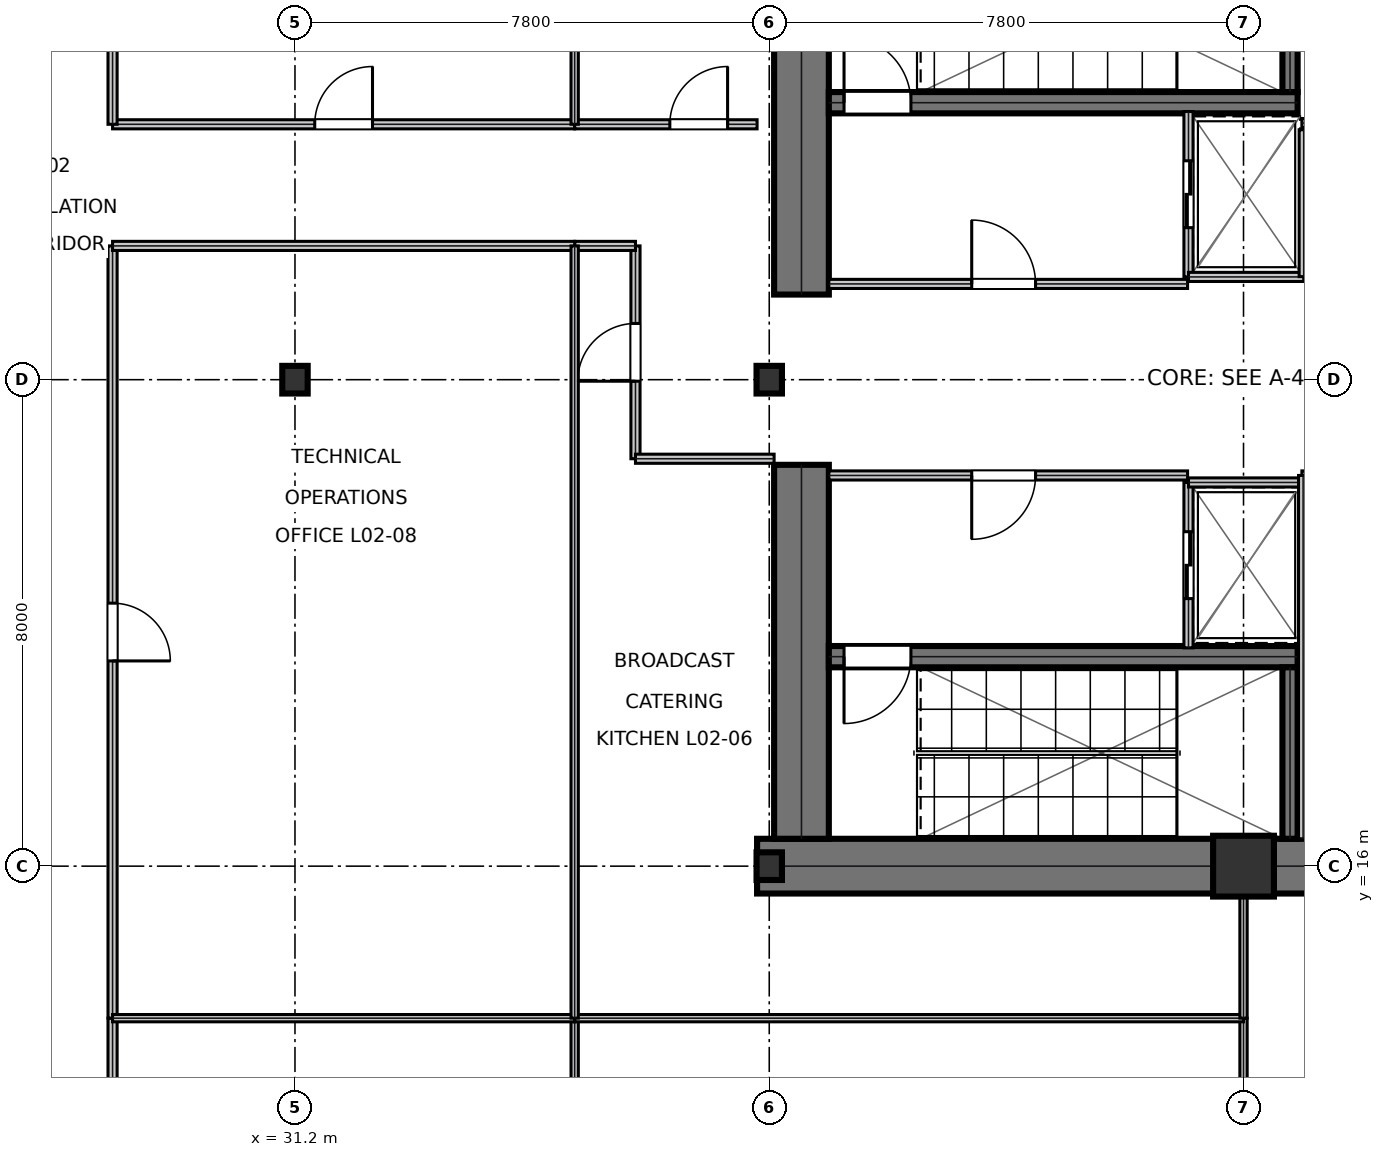
"""IFC4 building model, lengths in metres.
Left out: names, types, materials, properties, quantities, classifications, styles, units other than length and angle.
Written with IfcOpenShell. Run it as: python <this file> out.ifc"""

import sys

from ifc_helpers import new_model, si_unit, direction, frame, frame_2d, origin, origin_2d, place, context, subcontext, project, spatial, rectangle, i_section, extrude, element, fill, save


model = new_model("IFC4")
c1 = context("Model", 3, precision=1e-05, world=origin(), true_north=direction((0.0, 1.0)))
c2 = subcontext(c1, "Body", "Model", "MODEL_VIEW")
j1 = project(units=[si_unit("LENGTHUNIT", "METRE"), si_unit("PLANEANGLEUNIT", "RADIAN")], contexts=[c1])
p1 = place(None, origin())
s1 = spatial("IfcSite", under=j1, at=p1, CompositionType="ELEMENT")
p2 = place(p1, origin())
s2 = spatial("IfcBuilding", under=s1, at=p2, CompositionType="ELEMENT")
p3 = place(p2, frame((0.0, 0.0, 10.8)))
s3 = spatial("IfcBuildingStorey", under=s2, at=p3, CompositionType="ELEMENT", Elevation=10.8)
p4 = place(p3, frame((38.8, 16.0, 0.0), z_axis=(0.0, 0.0, 1.0), x_axis=(1.0, 0.0, 0.0)))
e1 = element("IfcWall", 1, at=p4, inside=s3, PredefinedType="SHEAR", context=c2, shape_type="SweptSolid", body=[
    extrude(rectangle(XDim=16.0, YDim=0.9, at=frame_2d((8.0, 0.0))), origin(), (0.0, 0.0, 1.0), 5.12),
])
for number, where, z_axis, x_axis in (
    (2, (39.53, 16.45, 0.0), (0.0, 0.0, 1.0), (0.0, 1.0, 0.0)),
    (3, (39.53, 25.4, 0.0), (0.0, 0.0, 1.0), (0.0, 1.0, 0.0)),
):
    element("IfcWall", number, at=place(p3, frame(where, z_axis=z_axis, x_axis=x_axis)), inside=s3, PredefinedType="SHEAR", context=c2, shape_type="SweptSolid", body=[
        extrude(rectangle(XDim=6.15, YDim=0.9, at=frame_2d((3.075, 0.0))), origin(), (0.0, 0.0, 1.0), 5.12),
    ])
p5 = place(p3, frame((39.98, 28.555, 0.0), z_axis=(0.0, 0.0, 1.0), x_axis=(1.0, 0.0, 0.0)))
e4 = element("IfcWall", 4, at=p5, inside=s3, PredefinedType="SHEAR", context=c2, shape_type="SweptSolid", body=[
    extrude(rectangle(XDim=7.71, YDim=0.35, at=frame_2d((3.855, 0.0))), origin(), (0.0, 0.0, 1.0), 5.12),
])
p6 = place(p5, frame((0.25, 0.0, 0.0)))
e5 = element("IfcOpeningElement", 5, at=p6, cuts=e4, PredefinedType="OPENING", context=c2, shape_type="SweptSolid", body=[
    extrude(rectangle(XDim=1.1, YDim=2.15, at=frame_2d((0.55, 1.075))), frame((0.0, 0.185, 0.0), z_axis=(0.0, -1.0, 0.0), x_axis=(1.0, 0.0, 0.0)), (0.0, 0.0, 1.0), 0.37),
])
p7 = place(p3, frame((39.98, 19.445, 0.0), z_axis=(0.0, 0.0, 1.0), x_axis=(1.0, 0.0, 0.0)))
e6 = element("IfcWall", 6, at=p7, inside=s3, PredefinedType="SHEAR", context=c2, shape_type="SweptSolid", body=[
    extrude(rectangle(XDim=7.71, YDim=0.35, at=frame_2d((3.855, 0.0))), origin(), (0.0, 0.0, 1.0), 5.12),
])
p8 = place(p7, frame((0.25, 0.0, 0.0)))
e7 = element("IfcOpeningElement", 7, at=p8, cuts=e6, PredefinedType="OPENING", context=c2, shape_type="SweptSolid", body=[
    extrude(rectangle(XDim=1.1, YDim=2.15, at=frame_2d((0.55, 1.075))), frame((0.0, 0.185, 0.0), z_axis=(0.0, -1.0, 0.0), x_axis=(1.0, 0.0, 0.0)), (0.0, 0.0, 1.0), 0.37),
])
for number, where, z_axis, x_axis in (
    (8, (47.565, 28.73, 0.0), (0.0, 0.0, 1.0), (0.0, 1.0, 0.0)),
    (9, (47.565, 16.45, 0.0), (0.0, 0.0, 1.0), (0.0, 1.0, 0.0)),
):
    element("IfcWall", number, at=place(p3, frame(where, z_axis=z_axis, x_axis=x_axis)), inside=s3, PredefinedType="SHEAR", context=c2, shape_type="SweptSolid", body=[
        extrude(rectangle(XDim=2.82, YDim=0.25, at=frame_2d((1.41, 0.0))), origin(), (0.0, 0.0, 1.0), 5.12),
    ])
for number, where, z_axis, x_axis in (
    (10, (31.2, 24.0, 0.0), (0.0, 0.0, 1.0), (1.0, 0.0, 0.0)),
    (11, (39.0, 16.0, 0.0), (0.0, 0.0, 1.0), (1.0, 0.0, 0.0)),
    (12, (39.0, 24.0, 0.0), (0.0, 0.0, 1.0), (1.0, 0.0, 0.0)),
):
    element("IfcColumn", number, at=place(p3, frame(where, z_axis=z_axis, x_axis=x_axis)), inside=s3, PredefinedType="COLUMN", context=c2, shape_type="SweptSolid", body=[
        extrude(i_section(OverallWidth=0.418, OverallDepth=0.455, WebThickness=0.042, FlangeThickness=0.068, at=origin_2d()), origin(), (0.0, 0.0, 1.0), 5.395),
    ])
p9 = place(p3, frame((46.8, 16.0, 0.0), z_axis=(0.0, 0.0, 1.0), x_axis=(1.0, 0.0, 0.0)))
e13 = element("IfcColumn", 13, at=p9, inside=s3, PredefinedType="COLUMN", context=c2, shape_type="SweptSolid", body=[
    extrude(rectangle(XDim=1.0, YDim=1.0, at=origin_2d()), origin(), (0.0, 0.0, 1.0), 5.395),
])
p10 = place(p3, frame((39.98, 25.575, 0.0), z_axis=(0.0, 0.0, 1.0), x_axis=(1.0, 0.0, 0.0)))
e14 = element("IfcWall", 14, at=p10, inside=s3, PredefinedType="PARTITIONING", context=c2, shape_type="SweptSolid", body=[
    extrude(rectangle(XDim=5.9, YDim=0.15, at=frame_2d((2.95, 0.0))), origin(), (0.0, 0.0, 1.0), 5.12),
])
p11 = place(p10, frame((2.35, 0.0, 0.0)))
e15 = element("IfcOpeningElement", 15, at=p11, cuts=e14, PredefinedType="OPENING", context=c2, shape_type="SweptSolid", body=[
    extrude(rectangle(XDim=1.05, YDim=2.15, at=frame_2d((0.525, 1.075))), frame((0.0, 0.085, 0.0), z_axis=(0.0, -1.0, 0.0), x_axis=(1.0, 0.0, 0.0)), (0.0, 0.0, 1.0), 0.17),
])
p12 = place(p3, frame((39.98, 22.425, 0.0), z_axis=(0.0, 0.0, 1.0), x_axis=(1.0, 0.0, 0.0)))
e16 = element("IfcWall", 16, at=p12, inside=s3, PredefinedType="PARTITIONING", context=c2, shape_type="SweptSolid", body=[
    extrude(rectangle(XDim=5.9, YDim=0.15, at=frame_2d((2.95, 0.0))), origin(), (0.0, 0.0, 1.0), 5.12),
])
p13 = place(p12, frame((2.35, 0.0, 0.0)))
e17 = element("IfcOpeningElement", 17, at=p13, cuts=e16, PredefinedType="OPENING", context=c2, shape_type="SweptSolid", body=[
    extrude(rectangle(XDim=1.05, YDim=2.15, at=frame_2d((0.525, 1.075))), frame((0.0, 0.085, 0.0), z_axis=(0.0, -1.0, 0.0), x_axis=(1.0, 0.0, 0.0)), (0.0, 0.0, 1.0), 0.17),
])
p14 = place(p3, frame((45.895, 25.69, 0.0), z_axis=(0.0, 0.0, 1.0), x_axis=(0.0, 1.0, 0.0)))
e18 = element("IfcWall", 18, at=p14, inside=s3, PredefinedType="PARTITIONING", context=c2, shape_type="SweptSolid", body=[
    extrude(rectangle(XDim=2.72, YDim=0.15, at=frame_2d((1.36, 0.0))), origin(), (0.0, 0.0, 1.0), 5.12),
])
p15 = place(p14, frame((0.81, 0.0, 0.0)))
e19 = element("IfcOpeningElement", 19, at=p15, cuts=e18, PredefinedType="OPENING", context=c2, shape_type="SweptSolid", body=[
    extrude(rectangle(XDim=1.1, YDim=2.15, at=frame_2d((0.55, 1.075))), frame((0.0, 0.085, 0.0), z_axis=(0.0, -1.0, 0.0), x_axis=(1.0, 0.0, 0.0)), (0.0, 0.0, 1.0), 0.17),
])
p16 = place(p3, frame((45.895, 25.69, 0.0), z_axis=(0.0, 0.0, 1.0), x_axis=(1.0, 0.0, 0.0)))
e20 = element("IfcWall", 20, at=p16, inside=s3, PredefinedType="PARTITIONING", context=c2, shape_type="SweptSolid", body=[
    extrude(rectangle(XDim=1.915, YDim=0.15, at=frame_2d((0.958, 0.0))), origin(), (0.0, 0.0, 1.0), 5.12),
])
p17 = place(p3, frame((45.895, 19.59, 0.0), z_axis=(0.0, 0.0, 1.0), x_axis=(0.0, 1.0, 0.0)))
e21 = element("IfcWall", 21, at=p17, inside=s3, PredefinedType="PARTITIONING", context=c2, shape_type="SweptSolid", body=[
    extrude(rectangle(XDim=2.72, YDim=0.15, at=frame_2d((1.36, 0.0))), origin(), (0.0, 0.0, 1.0), 5.12),
])
p18 = place(p17, frame((0.81, 0.0, 0.0)))
e22 = element("IfcOpeningElement", 22, at=p18, cuts=e21, PredefinedType="OPENING", context=c2, shape_type="SweptSolid", body=[
    extrude(rectangle(XDim=1.1, YDim=2.15, at=frame_2d((0.55, 1.075))), frame((0.0, 0.085, 0.0), z_axis=(0.0, -1.0, 0.0), x_axis=(1.0, 0.0, 0.0)), (0.0, 0.0, 1.0), 0.17),
])
p19 = place(p3, frame((45.895, 22.31, 0.0), z_axis=(0.0, 0.0, 1.0), x_axis=(1.0, 0.0, 0.0)))
e23 = element("IfcWall", 23, at=p19, inside=s3, PredefinedType="PARTITIONING", context=c2, shape_type="SweptSolid", body=[
    extrude(rectangle(XDim=1.915, YDim=0.15, at=frame_2d((0.958, 0.0))), origin(), (0.0, 0.0, 1.0), 5.12),
])
p20 = place(p3, frame((47.79, 25.695, 0.0), z_axis=(0.0, 0.0, 1.0), x_axis=(0.0, 1.0, 0.0)))
e24 = element("IfcWall", 24, at=p20, inside=s3, PredefinedType="PARTITIONING", context=c2, shape_type="SweptSolid", body=[
    extrude(rectangle(XDim=2.415, YDim=0.15, at=frame_2d((1.208, 0.0))), origin(), (0.0, 0.0, 1.0), 5.12),
])
p21 = place(p3, frame((47.76, 22.425, 0.0), z_axis=(0.0, 0.0, 1.0), x_axis=(1.0, 0.0, 0.0)))
e25 = element("IfcWall", 25, at=p21, inside=s3, PredefinedType="PARTITIONING", context=c2, shape_type="SweptSolid", body=[
    extrude(rectangle(XDim=1.96, YDim=0.15, at=frame_2d((0.98, 0.0))), origin(), (0.0, 0.0, 1.0), 5.12),
])
p22 = place(p3, frame((47.78, 16.45, 0.0), z_axis=(0.0, 0.0, 1.0), x_axis=(0.0, 1.0, 0.0)))
e26 = element("IfcWall", 26, at=p22, inside=s3, PredefinedType="PARTITIONING", context=c2, shape_type="SweptSolid", body=[
    extrude(rectangle(XDim=5.975, YDim=0.15, at=frame_2d((2.988, 0.0))), origin(), (0.0, 0.0, 1.0), 5.12),
])
p23 = place(p3, frame((47.76, 28.22, 0.0), z_axis=(0.0, 0.0, 1.0), x_axis=(1.0, 0.0, 0.0)))
e27 = element("IfcWall", 27, at=p23, inside=s3, PredefinedType="PARTITIONING", context=c2, shape_type="SweptSolid", body=[
    extrude(rectangle(XDim=1.96, YDim=0.15, at=frame_2d((0.98, 0.0))), origin(), (0.0, 0.0, 1.0), 5.12),
])
p24 = place(p3, frame((28.2, 4.5, 0.0), z_axis=(0.0, 0.0, 1.0), x_axis=(0.0, 1.0, 0.0)))
e28 = element("IfcWall", 28, at=p24, inside=s3, PredefinedType="PARTITIONING", context=c2, shape_type="SweptSolid", body=[
    extrude(rectangle(XDim=9.0, YDim=0.15, at=frame_2d((4.5, 0.0))), origin(), (0.0, 0.0, 1.0), 4.338),
])
p25 = place(p24, frame((4.025, 0.0, 0.0)))
e29 = element("IfcOpeningElement", 29, at=p25, cuts=e28, PredefinedType="OPENING", context=c2, shape_type="SweptSolid", body=[
    extrude(rectangle(XDim=0.95, YDim=2.15, at=frame_2d((0.475, 1.075))), frame((0.0, 0.085, 0.0), z_axis=(0.0, -1.0, 0.0), x_axis=(1.0, 0.0, 0.0)), (0.0, 0.0, 1.0), 0.17),
])
p26 = place(p3, frame((36.8, 22.7, 0.0), z_axis=(0.0, 0.0, 1.0), x_axis=(0.0, 1.0, 0.0)))
e30 = element("IfcWall", 30, at=p26, inside=s3, PredefinedType="PARTITIONING", context=c2, shape_type="SweptSolid", body=[
    extrude(rectangle(XDim=3.5, YDim=0.15, at=frame_2d((1.75, 0.0))), origin(), (0.0, 0.0, 1.0), 4.338),
])
p27 = place(p26, frame((1.275, 0.0, 0.0)))
e31 = element("IfcOpeningElement", 31, at=p27, cuts=e30, PredefinedType="OPENING", context=c2, shape_type="SweptSolid", body=[
    extrude(rectangle(XDim=0.95, YDim=2.15, at=frame_2d((0.475, 1.075))), frame((0.0, 0.085, 0.0), z_axis=(0.0, -1.0, 0.0), x_axis=(1.0, 0.0, 0.0)), (0.0, 0.0, 1.0), 0.17),
])
p28 = place(p3, frame((28.2, 13.5, 0.0), z_axis=(0.0, 0.0, 1.0), x_axis=(0.0, 1.0, 0.0)))
e32 = element("IfcWall", 32, at=p28, inside=s3, PredefinedType="PARTITIONING", context=c2, shape_type="SweptSolid", body=[
    extrude(rectangle(XDim=12.7, YDim=0.15, at=frame_2d((6.35, 0.0))), origin(), (0.0, 0.0, 1.0), 3.688),
])
p29 = place(p28, frame((5.875, 0.0, 0.0)))
e33 = element("IfcOpeningElement", 33, at=p29, cuts=e32, PredefinedType="OPENING", context=c2, shape_type="SweptSolid", body=[
    extrude(rectangle(XDim=0.95, YDim=2.15, at=frame_2d((0.475, 1.075))), frame((0.0, 0.085, 0.0), z_axis=(0.0, -1.0, 0.0), x_axis=(1.0, 0.0, 0.0)), (0.0, 0.0, 1.0), 0.17),
])
p30 = place(p3, frame((28.2, 28.2, 0.0), z_axis=(0.0, 0.0, 1.0), x_axis=(1.0, 0.0, 0.0)))
e34 = element("IfcWall", 34, at=p30, inside=s3, PredefinedType="PARTITIONING", context=c2, shape_type="SweptSolid", body=[
    extrude(rectangle(XDim=7.6, YDim=0.15, at=frame_2d((3.8, 0.0))), origin(), (0.0, 0.0, 1.0), 4.415),
])
p31 = place(p30, frame((3.325, 0.0, 0.0)))
e35 = element("IfcOpeningElement", 35, at=p31, cuts=e34, PredefinedType="OPENING", context=c2, shape_type="SweptSolid", body=[
    extrude(rectangle(XDim=0.95, YDim=2.15, at=frame_2d((0.475, 1.075))), frame((0.0, 0.085, 0.0), z_axis=(0.0, -1.0, 0.0), x_axis=(1.0, 0.0, 0.0)), (0.0, 0.0, 1.0), 0.17),
])
p32 = place(p3, frame((35.8, 28.2, 0.0), z_axis=(0.0, 0.0, 1.0), x_axis=(1.0, 0.0, 0.0)))
e36 = element("IfcWall", 36, at=p32, inside=s3, PredefinedType="PARTITIONING", context=c2, shape_type="SweptSolid", body=[
    extrude(rectangle(XDim=3.0, YDim=0.15, at=frame_2d((1.5, 0.0))), origin(), (0.0, 0.0, 1.0), 5.12),
])
p33 = place(p32, frame((1.565, 0.0, 0.0)))
e37 = element("IfcOpeningElement", 37, at=p33, cuts=e36, PredefinedType="OPENING", context=c2, shape_type="SweptSolid", body=[
    extrude(rectangle(XDim=0.95, YDim=2.15, at=frame_2d((0.475, 1.075))), frame((0.0, 0.085, 0.0), z_axis=(0.0, -1.0, 0.0), x_axis=(1.0, 0.0, 0.0)), (0.0, 0.0, 1.0), 0.17),
])
p34 = place(p3, frame((36.8, 22.7, 0.0), z_axis=(0.0, 0.0, 1.0), x_axis=(1.0, 0.0, 0.0)))
e38 = element("IfcWall", 38, at=p34, inside=s3, PredefinedType="PARTITIONING", context=c2, shape_type="SweptSolid", body=[
    extrude(rectangle(XDim=2.28, YDim=0.15, at=frame_2d((1.14, 0.0))), origin(), (0.0, 0.0, 1.0), 4.415),
])
p35 = place(p3, frame((35.8, 26.2, 0.0), z_axis=(0.0, 0.0, 1.0), x_axis=(1.0, 0.0, 0.0)))
e39 = element("IfcWall", 39, at=p35, inside=s3, PredefinedType="PARTITIONING", context=c2, shape_type="SweptSolid", body=[
    extrude(rectangle(XDim=1.0, YDim=0.15, at=frame_2d((0.5, 0.0))), origin(), (0.0, 0.0, 1.0), 5.12),
])
p36 = place(p3, frame((28.2, 26.2, 0.0), z_axis=(0.0, 0.0, 1.0), x_axis=(1.0, 0.0, 0.0)))
e40 = element("IfcWall", 40, at=p36, inside=s3, PredefinedType="PARTITIONING", context=c2, shape_type="SweptSolid", body=[
    extrude(rectangle(XDim=7.6, YDim=0.15, at=frame_2d((3.8, 0.0))), origin(), (0.0, 0.0, 1.0), 4.415),
])
p37 = place(p3, frame((28.2, 28.2, 0.0), z_axis=(0.0, 0.0, 1.0), x_axis=(0.0, 1.0, 0.0)))
e41 = element("IfcWall", 41, at=p37, inside=s3, PredefinedType="PARTITIONING", context=c2, shape_type="SweptSolid", body=[
    extrude(rectangle(XDim=7.1, YDim=0.15, at=frame_2d((3.55, 0.0))), origin(), (0.0, 0.0, 1.0), 4.338),
])
p38 = place(p3, frame((35.8, 4.5, 0.0), z_axis=(0.0, 0.0, 1.0), x_axis=(0.0, 1.0, 0.0)))
e42 = element("IfcWall", 42, at=p38, inside=s3, PredefinedType="PARTITIONING", context=c2, shape_type="SweptSolid", body=[
    extrude(rectangle(XDim=9.0, YDim=0.12, at=frame_2d((4.5, 0.0))), origin(), (0.0, 0.0, 1.0), 4.338),
])
p39 = place(p3, frame((28.2, 13.5, 0.0), z_axis=(0.0, 0.0, 1.0), x_axis=(1.0, 0.0, 0.0)))
e43 = element("IfcWall", 43, at=p39, inside=s3, PredefinedType="PARTITIONING", context=c2, shape_type="SweptSolid", body=[
    extrude(rectangle(XDim=7.6, YDim=0.12, at=frame_2d((3.8, 0.0))), origin(), (0.0, 0.0, 1.0), 3.688),
])
p40 = place(p3, frame((46.8, 4.5, 0.0), z_axis=(0.0, 0.0, 1.0), x_axis=(0.0, 1.0, 0.0)))
e44 = element("IfcWall", 44, at=p40, inside=s3, PredefinedType="PARTITIONING", context=c2, shape_type="SweptSolid", body=[
    extrude(rectangle(XDim=9.0, YDim=0.12, at=frame_2d((4.5, 0.0))), origin(), (0.0, 0.0, 1.0), 4.338),
])
p41 = place(p3, frame((35.8, 13.5, 0.0), z_axis=(0.0, 0.0, 1.0), x_axis=(1.0, 0.0, 0.0)))
e45 = element("IfcWall", 45, at=p41, inside=s3, PredefinedType="PARTITIONING", context=c2, shape_type="SweptSolid", body=[
    extrude(rectangle(XDim=11.0, YDim=0.12, at=frame_2d((5.5, 0.0))), origin(), (0.0, 0.0, 1.0), 4.415),
])
p42 = place(p3, frame((46.8, 13.5, 0.0), z_axis=(0.0, 0.0, 1.0), x_axis=(0.0, 1.0, 0.0)))
e46 = element("IfcWall", 46, at=p42, inside=s3, PredefinedType="PARTITIONING", context=c2, shape_type="SweptSolid", body=[
    extrude(rectangle(XDim=2.1, YDim=0.12, at=frame_2d((1.05, 0.0))), origin(), (0.0, 0.0, 1.0), 4.415),
])
p43 = place(p3, frame((35.8, 13.5, 0.0), z_axis=(0.0, 0.0, 1.0), x_axis=(0.0, 1.0, 0.0)))
e47 = element("IfcWall", 47, at=p43, inside=s3, PredefinedType="PARTITIONING", context=c2, shape_type="SweptSolid", body=[
    extrude(rectangle(XDim=12.7, YDim=0.12, at=frame_2d((6.35, 0.0))), origin(), (0.0, 0.0, 1.0), 3.688),
])
p44 = place(p3, frame((35.8, 28.2, 0.0), z_axis=(0.0, 0.0, 1.0), x_axis=(0.0, 1.0, 0.0)))
e48 = element("IfcWall", 48, at=p44, inside=s3, PredefinedType="PARTITIONING", context=c2, shape_type="SweptSolid", body=[
    extrude(rectangle(XDim=7.1, YDim=0.12, at=frame_2d((3.55, 0.0))), origin(), (0.0, 0.0, 1.0), 4.338),
])
p45 = place(p11, origin())
e49 = element("IfcDoor", 49, at=p45, inside=s3, OperationType="SINGLE_SWING_LEFT", PredefinedType="DOOR", context=c2, shape_type="SweptSolid", body=[
    extrude(rectangle(XDim=1.05, YDim=2.15, at=frame_2d((0.525, 1.075))), frame((0.0, 0.025, 0.0), z_axis=(0.0, -1.0, 0.0), x_axis=(1.0, 0.0, 0.0)), (0.0, 0.0, 1.0), 0.05),
])
fill(e15, e49)
p46 = place(p13, frame((1.05, 0.0, 0.0), z_axis=(0.0, 0.0, 1.0), x_axis=(-1.0, 0.0, 0.0)))
e50 = element("IfcDoor", 50, at=p46, inside=s3, OperationType="SINGLE_SWING_RIGHT", PredefinedType="DOOR", context=c2, shape_type="SweptSolid", body=[
    extrude(rectangle(XDim=1.05, YDim=2.15, at=frame_2d((0.525, 1.075))), frame((0.0, 0.025, 0.0), z_axis=(0.0, -1.0, 0.0), x_axis=(1.0, 0.0, 0.0)), (0.0, 0.0, 1.0), 0.05),
])
fill(e17, e50)
p47 = place(p15, frame((1.1, 0.0, 0.0), z_axis=(0.0, 0.0, 1.0), x_axis=(-1.0, 0.0, 0.0)))
e51 = element("IfcDoor", 51, at=p47, inside=s3, OperationType="DOUBLE_DOOR_SLIDING", PredefinedType="DOOR", context=c2, shape_type="SweptSolid", body=[
    extrude(rectangle(XDim=1.1, YDim=2.15, at=frame_2d((0.55, 1.075))), frame((0.0, 0.025, 0.0), z_axis=(0.0, -1.0, 0.0), x_axis=(1.0, 0.0, 0.0)), (0.0, 0.0, 1.0), 0.05),
])
fill(e19, e51)
p48 = place(p18, frame((1.1, 0.0, 0.0), z_axis=(0.0, 0.0, 1.0), x_axis=(-1.0, 0.0, 0.0)))
e52 = element("IfcDoor", 52, at=p48, inside=s3, OperationType="DOUBLE_DOOR_SLIDING", PredefinedType="DOOR", context=c2, shape_type="SweptSolid", body=[
    extrude(rectangle(XDim=1.1, YDim=2.15, at=frame_2d((0.55, 1.075))), frame((0.0, 0.025, 0.0), z_axis=(0.0, -1.0, 0.0), x_axis=(1.0, 0.0, 0.0)), (0.0, 0.0, 1.0), 0.05),
])
fill(e22, e52)
p49 = place(p27, origin())
e53 = element("IfcDoor", 53, at=p49, inside=s3, OperationType="SINGLE_SWING_LEFT", PredefinedType="DOOR", context=c2, shape_type="SweptSolid", body=[
    extrude(rectangle(XDim=0.95, YDim=2.15, at=frame_2d((0.475, 1.075))), frame((0.0, 0.025, 0.0), z_axis=(0.0, -1.0, 0.0), x_axis=(1.0, 0.0, 0.0)), (0.0, 0.0, 1.0), 0.05),
])
fill(e31, e53)
p50 = place(p29, frame((0.95, 0.0, 0.0), z_axis=(0.0, 0.0, 1.0), x_axis=(-1.0, 0.0, 0.0)))
e54 = element("IfcDoor", 54, at=p50, inside=s3, OperationType="SINGLE_SWING_RIGHT", PredefinedType="DOOR", context=c2, shape_type="SweptSolid", body=[
    extrude(rectangle(XDim=0.95, YDim=2.15, at=frame_2d((0.475, 1.075))), frame((0.0, 0.025, 0.0), z_axis=(0.0, -1.0, 0.0), x_axis=(1.0, 0.0, 0.0)), (0.0, 0.0, 1.0), 0.05),
])
fill(e33, e54)
p51 = place(p31, origin())
e55 = element("IfcDoor", 55, at=p51, inside=s3, OperationType="SINGLE_SWING_RIGHT", PredefinedType="DOOR", context=c2, shape_type="SweptSolid", body=[
    extrude(rectangle(XDim=0.95, YDim=2.15, at=frame_2d((0.475, 1.075))), frame((0.0, 0.025, 0.0), z_axis=(0.0, -1.0, 0.0), x_axis=(1.0, 0.0, 0.0)), (0.0, 0.0, 1.0), 0.05),
])
fill(e35, e55)
p52 = place(p33, origin())
e56 = element("IfcDoor", 56, at=p52, inside=s3, OperationType="SINGLE_SWING_RIGHT", PredefinedType="DOOR", context=c2, shape_type="SweptSolid", body=[
    extrude(rectangle(XDim=0.95, YDim=2.15, at=frame_2d((0.475, 1.075))), frame((0.0, 0.025, 0.0), z_axis=(0.0, -1.0, 0.0), x_axis=(1.0, 0.0, 0.0)), (0.0, 0.0, 1.0), 0.05),
])
fill(e37, e56)
p53 = place(p6, origin())
e57 = element("IfcDoor", 57, at=p53, inside=s3, OperationType="SINGLE_SWING_LEFT", PredefinedType="DOOR", context=c2, shape_type="SweptSolid", body=[
    extrude(rectangle(XDim=1.1, YDim=2.15, at=frame_2d((0.55, 1.075))), frame((0.0, 0.025, 0.0), z_axis=(0.0, -1.0, 0.0), x_axis=(1.0, 0.0, 0.0)), (0.0, 0.0, 1.0), 0.05),
])
fill(e5, e57)
p54 = place(p8, frame((1.1, 0.0, 0.0), z_axis=(0.0, 0.0, 1.0), x_axis=(-1.0, 0.0, 0.0)))
e58 = element("IfcDoor", 58, at=p54, inside=s3, OperationType="SINGLE_SWING_RIGHT", PredefinedType="DOOR", context=c2, shape_type="SweptSolid", body=[
    extrude(rectangle(XDim=1.1, YDim=2.15, at=frame_2d((0.55, 1.075))), frame((0.0, 0.025, 0.0), z_axis=(0.0, -1.0, 0.0), x_axis=(1.0, 0.0, 0.0)), (0.0, 0.0, 1.0), 0.05),
])
fill(e7, e58)
save(model, sys.argv[1])
